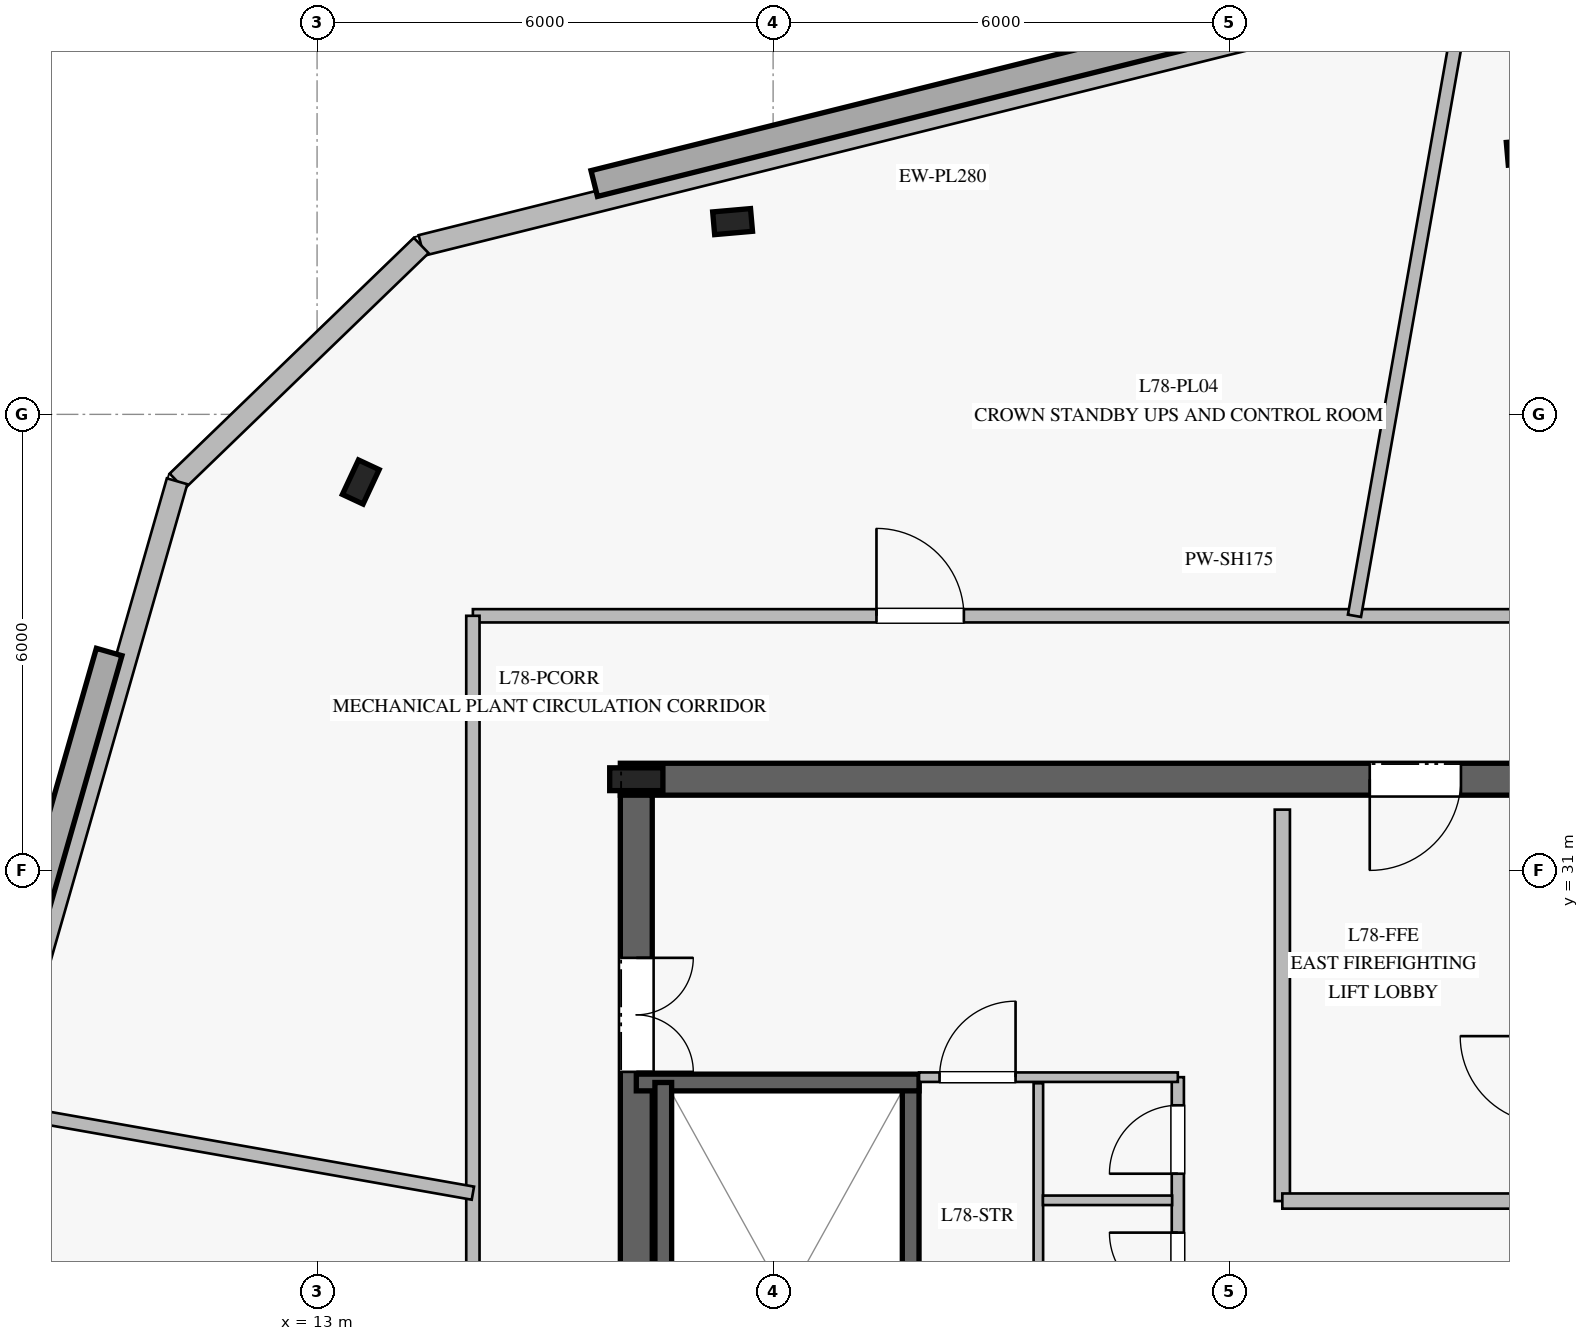
"""IFC4 building model, lengths in metres.
Left out: names, types, materials, properties, quantities, classifications, styles, units other than length and angle.
Written with IfcOpenShell. Run it as: python <this file> out.ifc"""

import sys

from ifc_helpers import new_model, si_unit, direction, frame, frame_2d, origin, origin_2d, place, context, subcontext, project, spatial, rectangle, i_section, extrude, element, fill, save


model = new_model("IFC4")
c1 = context("Model", 3, precision=1e-05, world=origin(), true_north=direction((0.0, 1.0)))
c2 = subcontext(c1, "Body", "Model", "MODEL_VIEW")
j1 = project(units=[si_unit("LENGTHUNIT", "METRE"), si_unit("PLANEANGLEUNIT", "RADIAN")], contexts=[c1])
p1 = place(None, origin())
s1 = spatial("IfcSite", under=j1, at=p1, CompositionType="ELEMENT")
p2 = place(p1, origin())
s2 = spatial("IfcBuilding", under=s1, at=p2, CompositionType="ELEMENT")
p3 = place(p2, frame((0.0, 0.0, 322.6)))
s3 = spatial("IfcBuildingStorey", under=s2, at=p3, CompositionType="ELEMENT", Elevation=322.6)
p4 = place(p3, frame((33.01, 32.2, 0.0), z_axis=(0.0, 0.0, 1.0), x_axis=(-1.0, 0.0, 0.0)))
e1 = element("IfcWall", 1, at=p4, inside=s3, PredefinedType="SHEAR", context=c2, shape_type="SweptSolid", body=[
    extrude(rectangle(XDim=16.02, YDim=0.42, at=frame_2d((8.01, 0.0))), origin(), (0.0, 0.0, 1.0), 4.1),
])
p5 = place(p4, frame((4.96, 0.0, 0.0)))
e2 = element("IfcOpeningElement", 2, at=p5, cuts=e1, PredefinedType="OPENING", context=c2, shape_type="SweptSolid", body=[
    extrude(rectangle(XDim=1.2, YDim=2.25, at=frame_2d((0.6, 1.125))), frame((0.0, 0.22, 0.0), z_axis=(0.0, -1.0, 0.0), x_axis=(1.0, 0.0, 0.0)), (0.0, 0.0, 1.0), 0.44),
])
p6 = place(p3, frame((17.2, 31.99, 0.0), z_axis=(0.0, 0.0, 1.0), x_axis=(0.0, -1.0, 0.0)))
e3 = element("IfcWall", 3, at=p6, inside=s3, PredefinedType="SHEAR", context=c2, shape_type="SweptSolid", body=[
    extrude(rectangle(XDim=13.98, YDim=0.42, at=frame_2d((6.99, 0.0))), origin(), (0.0, 0.0, 1.0), 4.1),
])
p7 = place(p6, frame((2.14, 0.0, 0.0)))
e4 = element("IfcOpeningElement", 4, at=p7, cuts=e3, PredefinedType="OPENING", context=c2, shape_type="SweptSolid", body=[
    extrude(rectangle(XDim=1.5, YDim=2.2, at=frame_2d((0.75, 1.1))), frame((0.0, 0.22, 0.0), z_axis=(0.0, -1.0, 0.0), x_axis=(1.0, 0.0, 0.0)), (0.0, 0.0, 1.0), 0.44),
])
p8 = place(p3, frame((17.2, 32.2, 0.0), z_axis=(0.0, 0.0, 1.0), x_axis=(1.0, 0.0, 0.0)))
e5 = element("IfcColumn", 5, at=p8, inside=s3, PredefinedType="COLUMN", context=c2, shape_type="SweptSolid", body=[
    extrude(i_section(OverallWidth=0.3, OverallDepth=0.7, WebThickness=0.017, FlangeThickness=0.032, at=origin_2d()), origin(), (0.0, 0.0, 1.0), 4.4),
])
p9 = place(p3, frame((20.81, 20.99, 0.0), z_axis=(0.0, 0.0, 1.0), x_axis=(0.0, 1.0, 0.0)))
e6 = element("IfcWall", 6, at=p9, inside=s3, PredefinedType="SOLIDWALL", context=c2, shape_type="SweptSolid", body=[
    extrude(rectangle(XDim=7.22, YDim=0.22, at=frame_2d((3.61, 0.0))), origin(), (0.0, 0.0, 1.0), 4.1),
])
p10 = place(p9, frame((0.18, 0.0, 0.0)))
e7 = element("IfcOpeningElement", 7, at=p10, cuts=e6, PredefinedType="OPENING", context=c2, shape_type="SweptSolid", body=[
    extrude(rectangle(XDim=1.15, YDim=2.2, at=frame_2d((0.575, 1.1))), frame((0.0, 0.12, 0.0), z_axis=(0.0, -1.0, 0.0), x_axis=(1.0, 0.0, 0.0)), (0.0, 0.0, 1.0), 0.24),
])
p11 = place(p3, frame((17.2, 28.21, 0.0), z_axis=(0.0, 0.0, 1.0), x_axis=(1.0, 0.0, 0.0)))
e8 = element("IfcWall", 8, at=p11, inside=s3, PredefinedType="SOLIDWALL", context=c2, shape_type="SweptSolid", body=[
    extrude(rectangle(XDim=3.72, YDim=0.22, at=frame_2d((1.86, 0.0))), origin(), (0.0, 0.0, 1.0), 4.1),
])
p12 = place(p3, frame((17.555, 28.21, 0.0), z_axis=(0.0, 0.0, 1.0), x_axis=(0.0, -1.0, 0.0)))
e9 = element("IfcWall", 9, at=p12, inside=s3, PredefinedType="SOLIDWALL", context=c2, shape_type="SweptSolid", body=[
    extrude(rectangle(XDim=7.22, YDim=0.22, at=frame_2d((3.61, 0.0))), origin(), (0.0, 0.0, 1.0), 4.1),
])
for number, where, z_axis, x_axis in (
    (10, (18.467, 39.536, 0.0), (0.0, 0.0, 1.0), (0.996, 0.087, 0.0)),
    (11, (13.575, 36.11, 0.0), (0.0, 0.0, 1.0), (0.423, 0.906, 0.0)),
):
    element("IfcColumn", number, at=place(p3, frame(where, z_axis=z_axis, x_axis=x_axis)), inside=s3, PredefinedType="COLUMN", context=c2, shape_type="SweptSolid", body=[
        extrude(i_section(OverallWidth=0.3, OverallDepth=0.5, WebThickness=0.014, FlangeThickness=0.028, at=origin_2d()), origin(), (0.0, 0.0, 1.0), 4.4),
    ])
p13 = place(p3, frame((27.71, 42.548, 0.0), z_axis=(0.0, 0.0, 1.0), x_axis=(-0.970292733591, -0.241933898288, 0.0)))
e12 = element("IfcWall", 12, at=p13, inside=s3, PredefinedType="STANDARD", context=c2, shape_type="SweptSolid", body=[
    extrude(rectangle(XDim=13.748, YDim=0.28, at=frame_2d((6.874, 0.0))), origin(), (0.0, 0.0, 1.0), 4.1),
])
p14 = place(p3, frame((14.37, 39.222, 0.0), z_axis=(0.0, 0.0, 1.0), x_axis=(-0.719355296742, -0.694642323106, 0.0)))
e13 = element("IfcWall", 13, at=p14, inside=s3, PredefinedType="STANDARD", context=c2, shape_type="SweptSolid", body=[
    extrude(rectangle(XDim=4.465, YDim=0.28, at=frame_2d((2.233, 0.0))), origin(), (0.0, 0.0, 1.0), 4.1),
])
p15 = place(p3, frame((11.158, 36.12, 0.0), z_axis=(0.0, 0.0, 1.0), x_axis=(-0.275616991697, -0.961267535022, 0.0)))
e14 = element("IfcWall", 14, at=p15, inside=s3, PredefinedType="STANDARD", context=c2, shape_type="SweptSolid", body=[
    extrude(rectangle(XDim=13.748, YDim=0.28, at=frame_2d((6.874, 0.0))), origin(), (0.0, 0.0, 1.0), 4.1),
])
p16 = place(p3, frame((32.001, 41.317, 0.0), z_axis=(0.0, 0.0, 1.0), x_axis=(-0.961215848043, 0.275797196272, 0.0)))
e15 = element("IfcWall", 15, at=p16, inside=s3, PredefinedType="STANDARD", context=c2, shape_type="SweptSolid", body=[
    extrude(rectangle(XDim=4.464, YDim=0.28, at=frame_2d((2.232, 0.0))), origin(), (0.0, 0.0, 1.0), 4.1),
])
p17 = place(p3, frame((25.7, 26.65, 0.0), z_axis=(0.0, 0.0, 1.0), x_axis=(0.0, 1.0, 0.0)))
e16 = element("IfcWall", 16, at=p17, inside=s3, PredefinedType="PARTITIONING", context=c2, shape_type="SweptSolid", body=[
    extrude(rectangle(XDim=5.15, YDim=0.2, at=frame_2d((2.575, 0.0))), origin(), (0.0, 0.0, 1.0), 3.37),
])
p18 = place(p3, frame((25.7, 26.65, 0.0), z_axis=(0.0, 0.0, 1.0), x_axis=(1.0, 0.0, 0.0)))
e17 = element("IfcWall", 17, at=p18, inside=s3, PredefinedType="PARTITIONING", context=c2, shape_type="SweptSolid", body=[
    extrude(rectangle(XDim=3.38, YDim=0.2, at=frame_2d((1.69, 0.0))), origin(), (0.0, 0.0, 1.0), 2.82),
])
p19 = place(p3, frame((24.325, 23.35, 0.0), z_axis=(0.0, 0.0, 1.0), x_axis=(0.0, 1.0, 0.0)))
e18 = element("IfcWall", 18, at=p19, inside=s3, PredefinedType="PLUMBINGWALL", context=c2, shape_type="SweptSolid", body=[
    extrude(rectangle(XDim=4.93, YDim=0.16, at=frame_2d((2.465, 0.0))), origin(), (0.0, 0.0, 1.0), 2.82),
])
p20 = place(p19, frame((0.325, 0.0, 0.0)))
e19 = element("IfcOpeningElement", 19, at=p20, cuts=e18, PredefinedType="OPENING", context=c2, shape_type="SweptSolid", body=[
    extrude(rectangle(XDim=0.95, YDim=2.1, at=frame_2d((0.475, 1.05))), frame((0.0, 0.09, 0.0), z_axis=(0.0, -1.0, 0.0), x_axis=(1.0, 0.0, 0.0)), (0.0, 0.0, 1.0), 0.18),
])
p21 = place(p19, frame((1.985, 0.0, 0.0)))
e20 = element("IfcOpeningElement", 20, at=p21, cuts=e18, PredefinedType="OPENING", context=c2, shape_type="SweptSolid", body=[
    extrude(rectangle(XDim=0.9, YDim=2.1, at=frame_2d((0.45, 1.05))), frame((0.0, 0.09, 0.0), z_axis=(0.0, -1.0, 0.0), x_axis=(1.0, 0.0, 0.0)), (0.0, 0.0, 1.0), 0.18),
])
p22 = place(p19, frame((3.66, 0.0, 0.0)))
e21 = element("IfcOpeningElement", 21, at=p22, cuts=e18, PredefinedType="OPENING", context=c2, shape_type="SweptSolid", body=[
    extrude(rectangle(XDim=0.9, YDim=2.1, at=frame_2d((0.45, 1.05))), frame((0.0, 0.09, 0.0), z_axis=(0.0, -1.0, 0.0), x_axis=(1.0, 0.0, 0.0)), (0.0, 0.0, 1.0), 0.18),
])
p23 = place(p3, frame((20.92, 28.28, 0.0), z_axis=(0.0, 0.0, 1.0), x_axis=(1.0, 0.0, 0.0)))
e22 = element("IfcWall", 22, at=p23, inside=s3, PredefinedType="PARTITIONING", context=c2, shape_type="SweptSolid", body=[
    extrude(rectangle(XDim=3.405, YDim=0.125, at=frame_2d((1.703, 0.0))), origin(), (0.0, 0.0, 1.0), 2.82),
])
p24 = place(p23, frame((0.27, 0.0, 0.0)))
e23 = element("IfcOpeningElement", 23, at=p24, cuts=e22, PredefinedType="OPENING", context=c2, shape_type="SweptSolid", body=[
    extrude(rectangle(XDim=1.0, YDim=2.15, at=frame_2d((0.5, 1.075))), frame((0.0, 0.073, 0.0), z_axis=(0.0, -1.0, 0.0), x_axis=(1.0, 0.0, 0.0)), (0.0, 0.0, 1.0), 0.145),
])
p25 = place(p3, frame((22.49, 24.97, 0.0), z_axis=(0.0, 0.0, 1.0), x_axis=(0.0, 1.0, 0.0)))
e24 = element("IfcWall", 24, at=p25, inside=s3, PredefinedType="PARTITIONING", context=c2, shape_type="SweptSolid", body=[
    extrude(rectangle(XDim=3.23, YDim=0.125, at=frame_2d((1.615, 0.0))), origin(), (0.0, 0.0, 1.0), 2.82),
])
p26 = place(p3, frame((22.55, 26.66, 0.0), z_axis=(0.0, 0.0, 1.0), x_axis=(1.0, 0.0, 0.0)))
e25 = element("IfcWall", 25, at=p26, inside=s3, PredefinedType="PARTITIONING", context=c2, shape_type="SweptSolid", body=[
    extrude(rectangle(XDim=1.7, YDim=0.125, at=frame_2d((0.85, 0.0))), origin(), (0.0, 0.0, 1.0), 2.82),
])
p27 = place(p3, frame((15.05, 34.35, 0.0), z_axis=(0.0, 0.0, 1.0), x_axis=(1.0, 0.0, 0.0)))
e26 = element("IfcWall", 26, at=p27, inside=s3, PredefinedType="PARTITIONING", context=c2, shape_type="SweptSolid", body=[
    extrude(rectangle(XDim=19.9, YDim=0.175, at=frame_2d((9.95, 0.0))), origin(), (0.0, 0.0, 1.0), 3.6),
])
p28 = place(p27, frame((15.016, 0.0, 0.0)))
e27 = element("IfcOpeningElement", 27, at=p28, cuts=e26, PredefinedType="OPENING", context=c2, shape_type="SweptSolid", body=[
    extrude(rectangle(XDim=1.15, YDim=2.2, at=frame_2d((0.575, 1.1))), frame((0.0, 0.098, 0.0), z_axis=(0.0, -1.0, 0.0), x_axis=(1.0, 0.0, 0.0)), (0.0, 0.0, 1.0), 0.195),
])
p29 = place(p27, frame((5.31, 0.0, 0.0)))
e28 = element("IfcOpeningElement", 28, at=p29, cuts=e26, PredefinedType="OPENING", context=c2, shape_type="SweptSolid", body=[
    extrude(rectangle(XDim=1.15, YDim=2.2, at=frame_2d((0.575, 1.1))), frame((0.0, 0.098, 0.0), z_axis=(0.0, -1.0, 0.0), x_axis=(1.0, 0.0, 0.0)), (0.0, 0.0, 1.0), 0.195),
])
p30 = place(p3, frame((15.05, 15.65, 0.0), z_axis=(0.0, 0.0, 1.0), x_axis=(0.0, 1.0, 0.0)))
e29 = element("IfcWall", 29, at=p30, inside=s3, PredefinedType="PARTITIONING", context=c2, shape_type="SweptSolid", body=[
    extrude(rectangle(XDim=18.7, YDim=0.175, at=frame_2d((9.35, 0.0))), origin(), (0.0, 0.0, 1.0), 3.6),
])
p31 = place(p3, frame((26.649, 34.35, 0.0), z_axis=(0.0, 0.0, 1.0), x_axis=(0.173619687581, 0.984812776158, 0.0)))
e30 = element("IfcWall", 30, at=p31, inside=s3, PredefinedType="PARTITIONING", context=c2, shape_type="SweptSolid", body=[
    extrude(rectangle(XDim=8.156, YDim=0.175, at=frame_2d((4.078, 0.0))), origin(), (0.0, 0.0, 1.0), 3.6),
])
p32 = place(p3, frame((15.05, 26.754, 0.0), z_axis=(0.0, 0.0, 1.0), x_axis=(-0.984791769213, 0.173738801913, 0.0)))
e31 = element("IfcWall", 31, at=p32, inside=s3, PredefinedType="PARTITIONING", context=c2, shape_type="SweptSolid", body=[
    extrude(rectangle(XDim=6.286, YDim=0.175, at=frame_2d((3.143, 0.0))), origin(), (0.0, 0.0, 1.0), 3.6),
])
p33 = place(p5, origin())
e32 = element("IfcDoor", 32, at=p33, inside=s3, OperationType="SINGLE_SWING_RIGHT", PredefinedType="DOOR", context=c2, shape_type="SweptSolid", body=[
    extrude(rectangle(XDim=1.2, YDim=2.25, at=frame_2d((0.6, 1.125))), frame((0.0, 0.025, 0.0), z_axis=(0.0, -1.0, 0.0), x_axis=(1.0, 0.0, 0.0)), (0.0, 0.0, 1.0), 0.05),
])
fill(e2, e32)
p34 = place(p7, origin())
e33 = element("IfcDoor", 33, at=p34, inside=s3, OperationType="DOUBLE_DOOR_SINGLE_SWING", PredefinedType="DOOR", context=c2, shape_type="SweptSolid", body=[
    extrude(rectangle(XDim=1.5, YDim=2.2, at=frame_2d((0.75, 1.1))), frame((0.0, 0.025, 0.0), z_axis=(0.0, -1.0, 0.0), x_axis=(1.0, 0.0, 0.0)), (0.0, 0.0, 1.0), 0.05),
])
fill(e4, e33)
p35 = place(p21, origin())
e34 = element("IfcDoor", 34, at=p35, inside=s3, OperationType="SINGLE_SWING_RIGHT", PredefinedType="DOOR", context=c2, shape_type="SweptSolid", body=[
    extrude(rectangle(XDim=0.9, YDim=2.1, at=frame_2d((0.45, 1.05))), frame((0.0, 0.025, 0.0), z_axis=(0.0, -1.0, 0.0), x_axis=(1.0, 0.0, 0.0)), (0.0, 0.0, 1.0), 0.05),
])
fill(e20, e34)
p36 = place(p22, origin())
e35 = element("IfcDoor", 35, at=p36, inside=s3, OperationType="SINGLE_SWING_LEFT", PredefinedType="DOOR", context=c2, shape_type="SweptSolid", body=[
    extrude(rectangle(XDim=0.9, YDim=2.1, at=frame_2d((0.45, 1.05))), frame((0.0, 0.025, 0.0), z_axis=(0.0, -1.0, 0.0), x_axis=(1.0, 0.0, 0.0)), (0.0, 0.0, 1.0), 0.05),
])
fill(e21, e35)
p37 = place(p24, origin())
e36 = element("IfcDoor", 36, at=p37, inside=s3, OperationType="SINGLE_SWING_RIGHT", PredefinedType="DOOR", context=c2, shape_type="SweptSolid", body=[
    extrude(rectangle(XDim=1.0, YDim=2.15, at=frame_2d((0.5, 1.075))), frame((0.0, 0.025, 0.0), z_axis=(0.0, -1.0, 0.0), x_axis=(1.0, 0.0, 0.0)), (0.0, 0.0, 1.0), 0.05),
])
fill(e23, e36)
p38 = place(p29, origin())
e37 = element("IfcDoor", 37, at=p38, inside=s3, OperationType="SINGLE_SWING_LEFT", PredefinedType="DOOR", context=c2, shape_type="SweptSolid", body=[
    extrude(rectangle(XDim=1.15, YDim=2.2, at=frame_2d((0.575, 1.1))), frame((0.0, 0.025, 0.0), z_axis=(0.0, -1.0, 0.0), x_axis=(1.0, 0.0, 0.0)), (0.0, 0.0, 1.0), 0.05),
])
fill(e28, e37)
save(model, sys.argv[1])
